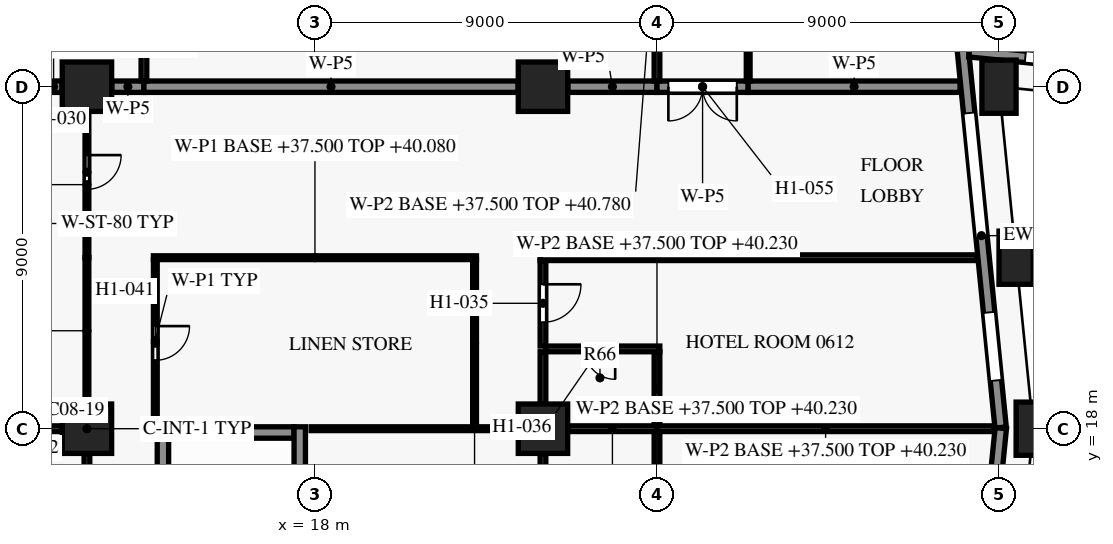
"""IFC4 building model, lengths in metres.
Left out: names, types, materials, properties, quantities, classifications, styles, units other than length and angle.
Written with IfcOpenShell. Run it as: python <this file> out.ifc"""

import sys

from ifc_helpers import new_model, si_unit, direction, frame, frame_2d, origin, origin_2d, place, context, subcontext, project, spatial, rectangle, extrude, element, fill, save


model = new_model("IFC4")
c1 = context("Model", 3, precision=1e-05, world=origin(), true_north=direction((0.0, 1.0)))
c2 = subcontext(c1, "Body", "Model", "MODEL_VIEW")
j1 = project(units=[si_unit("LENGTHUNIT", "METRE"), si_unit("PLANEANGLEUNIT", "RADIAN")], contexts=[c1])
p1 = place(None, origin())
s1 = spatial("IfcSite", under=j1, at=p1, CompositionType="ELEMENT")
p2 = place(p1, origin())
s2 = spatial("IfcBuilding", under=s1, at=p2, CompositionType="ELEMENT")
p3 = place(p2, frame((0.0, 0.0, 37.5)))
s3 = spatial("IfcBuildingStorey", under=s2, at=p3, CompositionType="ELEMENT", Elevation=37.5)
for number, where, z_axis, x_axis in (
    (1, (36.9, 18.0, 0.0), (0.0, 0.0, 1.0), (0.0, 1.0, 0.0)),
    (2, (36.45, 22.5, 0.0), (0.0, 0.0, 1.0), (-0.1, 0.995, 0.0)),
    (3, (36.0, 27.0, 0.0), (0.0, 0.0, 1.0), (-0.1, 0.995, 0.0)),
):
    element("IfcColumn", number, at=place(p3, frame(where, z_axis=z_axis, x_axis=x_axis)), inside=s3, PredefinedType="COLUMN", context=c2, shape_type="SweptSolid", body=[
        extrude(rectangle(XDim=0.9, YDim=1.4, at=origin_2d()), origin(), (0.0, 0.0, 1.0), 3.6),
    ])
for number, where, z_axis, x_axis in (
    (4, (12.0, 18.0, 0.0), (0.0, 0.0, 1.0), (1.0, 0.0, 0.0)),
    (5, (12.0, 27.0, 0.0), (0.0, 0.0, 1.0), (1.0, 0.0, 0.0)),
    (6, (24.0, 18.0, 0.0), (0.0, 0.0, 1.0), (1.0, 0.0, 0.0)),
    (7, (24.0, 27.0, 0.0), (0.0, 0.0, 1.0), (1.0, 0.0, 0.0)),
):
    element("IfcColumn", number, at=place(p3, frame(where, z_axis=z_axis, x_axis=x_axis)), inside=s3, PredefinedType="COLUMN", context=c2, shape_type="SweptSolid", body=[
        extrude(rectangle(XDim=1.3, YDim=1.3, at=origin_2d()), origin(), (0.0, 0.0, 1.0), 3.6),
    ])
p4 = place(p3, frame((36.047, 18.015, 0.0), z_axis=(0.0, 0.0, 1.0), x_axis=(-0.099522457379, -0.995035316196, 0.0)))
e8 = element("IfcWall", 8, at=p4, inside=s3, PredefinedType="SOLIDWALL", context=c2, shape_type="SweptSolid", body=[
    extrude(rectangle(XDim=9.03, YDim=0.3, at=frame_2d((4.515, 0.0))), origin(), (0.0, 0.0, 1.0), 2.95),
])
p5 = place(p4, frame((1.291, 0.0, 0.75)))
e9 = element("IfcOpeningElement", 9, at=p5, cuts=e8, PredefinedType="OPENING", context=c2, shape_type="SweptSolid", body=[
    extrude(rectangle(XDim=1.8, YDim=1.8, at=frame_2d((0.9, 0.9))), frame((0.0, 0.16, 0.0), z_axis=(0.0, -1.0, 0.0), x_axis=(1.0, 0.0, 0.0)), (0.0, 0.0, 1.0), 0.32),
])
p6 = place(p4, frame((5.064, 0.0, 0.15)))
e10 = element("IfcOpeningElement", 10, at=p6, cuts=e8, PredefinedType="OPENING", context=c2, shape_type="SweptSolid", body=[
    extrude(rectangle(XDim=3.3, YDim=2.4, at=frame_2d((1.65, 1.2))), frame((0.0, 0.16, 0.0), z_axis=(0.0, -1.0, 0.0), x_axis=(1.0, 0.0, 0.0)), (0.0, 0.0, 1.0), 0.32),
])
p7 = place(p3, frame((35.033, 28.132, 0.0), z_axis=(0.0, 0.0, 1.0), x_axis=(0.099487051997, -0.995038856771, 0.0)))
e11 = element("IfcWall", 11, at=p7, inside=s3, PredefinedType="SOLIDWALL", context=c2, shape_type="SweptSolid", body=[
    extrude(rectangle(XDim=10.152, YDim=0.3, at=frame_2d((5.076, 0.0))), origin(), (0.0, 0.0, 1.0), 2.95),
])
p8 = place(p7, frame((1.833, 0.0, 0.15)))
e12 = element("IfcOpeningElement", 12, at=p8, cuts=e11, PredefinedType="OPENING", context=c2, shape_type="SweptSolid", body=[
    extrude(rectangle(XDim=3.3, YDim=2.4, at=frame_2d((1.65, 1.2))), frame((0.0, 0.16, 0.0), z_axis=(0.0, -1.0, 0.0), x_axis=(1.0, 0.0, 0.0)), (0.0, 0.0, 1.0), 0.32),
])
p9 = place(p7, frame((7.106, 0.0, 0.75)))
e13 = element("IfcOpeningElement", 13, at=p9, cuts=e11, PredefinedType="OPENING", context=c2, shape_type="SweptSolid", body=[
    extrude(rectangle(XDim=1.8, YDim=1.8, at=frame_2d((0.9, 0.9))), frame((0.0, 0.16, 0.0), z_axis=(0.0, -1.0, 0.0), x_axis=(1.0, 0.0, 0.0)), (0.0, 0.0, 1.0), 0.32),
])
p10 = place(p3, frame((45.015, 26.953, 0.0), z_axis=(0.0, 0.0, 1.0), x_axis=(-0.995036699177, 0.099508629231, 0.0)))
e14 = element("IfcWall", 14, at=p10, inside=s3, PredefinedType="SOLIDWALL", context=c2, shape_type="SweptSolid", body=[
    extrude(rectangle(XDim=9.846, YDim=0.3, at=frame_2d((4.923, 0.0))), origin(), (0.0, 0.0, 1.0), 2.95),
])
p11 = place(p10, frame((1.291, 0.0, 0.75)))
e15 = element("IfcOpeningElement", 15, at=p11, cuts=e14, PredefinedType="OPENING", context=c2, shape_type="SweptSolid", body=[
    extrude(rectangle(XDim=1.8, YDim=1.8, at=frame_2d((0.9, 0.9))), frame((0.0, 0.16, 0.0), z_axis=(0.0, -1.0, 0.0), x_axis=(1.0, 0.0, 0.0)), (0.0, 0.0, 1.0), 0.32),
])
p12 = place(p10, frame((5.064, 0.0, 0.15)))
e16 = element("IfcOpeningElement", 16, at=p12, cuts=e14, PredefinedType="OPENING", context=c2, shape_type="SweptSolid", body=[
    extrude(rectangle(XDim=3.3, YDim=2.4, at=frame_2d((1.65, 1.2))), frame((0.0, 0.16, 0.0), z_axis=(0.0, -1.0, 0.0), x_axis=(1.0, 0.0, 0.0)), (0.0, 0.0, 1.0), 0.32),
])
p13 = place(p3, frame((14.15, 17.9, 0.0), z_axis=(0.0, 0.0, 1.0), x_axis=(1.0, 0.0, 0.0)))
e17 = element("IfcWall", 17, at=p13, inside=s3, PredefinedType="SHEAR", context=c2, shape_type="SweptSolid", body=[
    extrude(rectangle(XDim=3.3, YDim=0.3, at=frame_2d((1.65, 0.0))), origin(), (0.0, 0.0, 1.0), 3.3),
])
p14 = place(p3, frame((14.0, 9.75, 0.0), z_axis=(0.0, 0.0, 1.0), x_axis=(0.0, 1.0, 0.0)))
e18 = element("IfcWall", 18, at=p14, inside=s3, PredefinedType="SHEAR", context=c2, shape_type="SweptSolid", body=[
    extrude(rectangle(XDim=8.3, YDim=0.3, at=frame_2d((4.15, 0.0))), origin(), (0.0, 0.0, 1.0), 3.3),
])
p15 = place(p3, frame((17.6, 9.75, 0.0), z_axis=(0.0, 0.0, 1.0), x_axis=(0.0, 1.0, 0.0)))
e19 = element("IfcWall", 19, at=p15, inside=s3, PredefinedType="SHEAR", context=c2, shape_type="SweptSolid", body=[
    extrude(rectangle(XDim=8.3, YDim=0.3, at=frame_2d((4.15, 0.0))), origin(), (0.0, 0.0, 1.0), 3.3),
])
p16 = place(p15, frame((0.65, 0.0, 0.0)))
e20 = element("IfcOpeningElement", 20, at=p16, cuts=e19, PredefinedType="OPENING", context=c2, shape_type="SweptSolid", body=[
    extrude(rectangle(XDim=1.2, YDim=2.2, at=frame_2d((0.6, 1.1))), frame((0.0, 0.16, 0.0), z_axis=(0.0, -1.0, 0.0), x_axis=(1.0, 0.0, 0.0)), (0.0, 0.0, 1.0), 0.32),
])
p17 = place(p3, frame((12.0, 15.975, 0.0), z_axis=(0.0, 0.0, 1.0), x_axis=(0.0, 1.0, 0.0)))
e21 = element("IfcWall", 21, at=p17, inside=s3, PredefinedType="PARTITIONING", context=c2, shape_type="SweptSolid", body=[
    extrude(rectangle(XDim=1.37, YDim=0.15, at=frame_2d((0.685, 0.0))), origin(), (0.0, 0.0, 1.0), 2.58),
])
p18 = place(p3, frame((27.0, 15.975, 0.0), z_axis=(0.0, 0.0, 1.0), x_axis=(0.0, 1.0, 0.0)))
e22 = element("IfcWall", 22, at=p18, inside=s3, PredefinedType="PARTITIONING", context=c2, shape_type="SweptSolid", body=[
    extrude(rectangle(XDim=1.95, YDim=0.15, at=frame_2d((0.975, 0.0))), origin(), (0.0, 0.0, 1.0), 2.73),
])
p19 = place(p3, frame((24.0, 17.345, 0.0), z_axis=(0.0, 0.0, 1.0), x_axis=(0.0, -1.0, 0.0)))
e23 = element("IfcWall", 23, at=p19, inside=s3, PredefinedType="PARTITIONING", context=c2, shape_type="SweptSolid", body=[
    extrude(rectangle(XDim=1.37, YDim=0.15, at=frame_2d((0.685, 0.0))), origin(), (0.0, 0.0, 1.0), 2.58),
])
p20 = place(p3, frame((11.345, 18.0, 0.0), z_axis=(0.0, 0.0, 1.0), x_axis=(-1.0, 0.0, 0.0)))
e24 = element("IfcWall", 24, at=p20, inside=s3, PredefinedType="PARTITIONING", context=c2, shape_type="SweptSolid", body=[
    extrude(rectangle(XDim=2.345, YDim=0.15, at=frame_2d((1.172, 0.0))), origin(), (0.0, 0.0, 1.0), 2.73),
])
p21 = place(p3, frame((23.33, 18.0, 0.0), z_axis=(0.0, 0.0, 1.0), x_axis=(-1.0, 0.0, 0.0)))
e25 = element("IfcWall", 25, at=p21, inside=s3, PredefinedType="PARTITIONING", context=c2, shape_type="SweptSolid", body=[
    extrude(rectangle(XDim=5.43, YDim=0.1, at=frame_2d((2.715, 0.0))), origin(), (0.0, 0.0, 1.0), 2.73),
])
p22 = place(p3, frame((27.0, 18.0, 0.0), z_axis=(0.0, 0.0, 1.0), x_axis=(-1.0, 0.0, 0.0)))
e26 = element("IfcWall", 26, at=p22, inside=s3, PredefinedType="PARTITIONING", context=c2, shape_type="SweptSolid", body=[
    extrude(rectangle(XDim=2.345, YDim=0.15, at=frame_2d((1.172, 0.0))), origin(), (0.0, 0.0, 1.0), 2.73),
])
p23 = place(p3, frame((35.875, 18.0, 0.0), z_axis=(0.0, 0.0, 1.0), x_axis=(-1.0, 0.0, 0.0)))
e27 = element("IfcWall", 27, at=p23, inside=s3, PredefinedType="PARTITIONING", context=c2, shape_type="SweptSolid", body=[
    extrude(rectangle(XDim=8.875, YDim=0.15, at=frame_2d((4.438, 0.0))), origin(), (0.0, 0.0, 1.0), 2.73),
])
p24 = place(p3, frame((22.2, 18.05, 0.0), z_axis=(0.0, 0.0, 1.0), x_axis=(0.0, 1.0, 0.0)))
e28 = element("IfcWall", 28, at=p24, inside=s3, PredefinedType="PARTITIONING", context=c2, shape_type="SweptSolid", body=[
    extrude(rectangle(XDim=4.4, YDim=0.1, at=frame_2d((2.2, 0.0))), origin(), (0.0, 0.0, 1.0), 2.73),
])
p25 = place(p3, frame((27.0, 18.075, 0.0), z_axis=(0.0, 0.0, 1.0), x_axis=(0.0, 1.0, 0.0)))
e29 = element("IfcWall", 29, at=p25, inside=s3, PredefinedType="PARTITIONING", context=c2, shape_type="SweptSolid", body=[
    extrude(rectangle(XDim=1.95, YDim=0.15, at=frame_2d((0.975, 0.0))), origin(), (0.0, 0.0, 1.0), 2.73),
])
p26 = place(p3, frame((24.0, 20.025, 0.0), z_axis=(0.0, 0.0, 1.0), x_axis=(0.0, -1.0, 0.0)))
e30 = element("IfcWall", 30, at=p26, inside=s3, PredefinedType="PARTITIONING", context=c2, shape_type="SweptSolid", body=[
    extrude(rectangle(XDim=1.37, YDim=0.15, at=frame_2d((0.685, 0.0))), origin(), (0.0, 0.0, 1.0), 2.58),
])
p27 = place(p3, frame((27.075, 20.1, 0.0), z_axis=(0.0, 0.0, 1.0), x_axis=(-1.0, 0.0, 0.0)))
e31 = element("IfcWall", 31, at=p27, inside=s3, PredefinedType="PARTITIONING", context=c2, shape_type="SweptSolid", body=[
    extrude(rectangle(XDim=3.0, YDim=0.15, at=frame_2d((1.5, 0.0))), origin(), (0.0, 0.0, 1.0), 2.58),
])
p28 = place(p27, frame((1.175, 0.0, 0.0)))
e32 = element("IfcOpeningElement", 32, at=p28, cuts=e31, PredefinedType="OPENING", context=c2, shape_type="SweptSolid", body=[
    extrude(rectangle(XDim=0.8, YDim=2.1, at=frame_2d((0.4, 1.05))), frame((0.0, 0.085, 0.0), z_axis=(0.0, -1.0, 0.0), x_axis=(1.0, 0.0, 0.0)), (0.0, 0.0, 1.0), 0.17),
])
p29 = place(p3, frame((24.0, 22.425, 0.0), z_axis=(0.0, 0.0, 1.0), x_axis=(0.0, -1.0, 0.0)))
e33 = element("IfcWall", 33, at=p29, inside=s3, PredefinedType="PARTITIONING", context=c2, shape_type="SweptSolid", body=[
    extrude(rectangle(XDim=2.25, YDim=0.15, at=frame_2d((1.125, 0.0))), origin(), (0.0, 0.0, 1.0), 2.58),
])
p30 = place(p29, frame((0.625, 0.0, 0.0)))
e34 = element("IfcOpeningElement", 34, at=p30, cuts=e33, PredefinedType="OPENING", context=c2, shape_type="SweptSolid", body=[
    extrude(rectangle(XDim=1.0, YDim=2.1, at=frame_2d((0.5, 1.05))), frame((0.0, 0.085, 0.0), z_axis=(0.0, -1.0, 0.0), x_axis=(1.0, 0.0, 0.0)), (0.0, 0.0, 1.0), 0.17),
])
p31 = place(p3, frame((13.8, 22.45, 0.0), z_axis=(0.0, 0.0, 1.0), x_axis=(0.0, -1.0, 0.0)))
e35 = element("IfcWall", 35, at=p31, inside=s3, PredefinedType="PARTITIONING", context=c2, shape_type="SweptSolid", body=[
    extrude(rectangle(XDim=4.25, YDim=0.1, at=frame_2d((2.125, 0.0))), origin(), (0.0, 0.0, 1.0), 3.28),
])
p32 = place(p31, frame((1.75, 0.0, 0.0)))
e36 = element("IfcOpeningElement", 36, at=p32, cuts=e35, PredefinedType="OPENING", context=c2, shape_type="SweptSolid", body=[
    extrude(rectangle(XDim=0.9, YDim=2.1, at=frame_2d((0.45, 1.05))), frame((0.0, 0.06, 0.0), z_axis=(0.0, -1.0, 0.0), x_axis=(1.0, 0.0, 0.0)), (0.0, 0.0, 1.0), 0.12),
])
p33 = place(p3, frame((12.0, 22.5, 0.0), z_axis=(0.0, 0.0, 1.0), x_axis=(0.0, -1.0, 0.0)))
e37 = element("IfcWall", 37, at=p33, inside=s3, PredefinedType="PARTITIONING", context=c2, shape_type="SweptSolid", body=[
    extrude(rectangle(XDim=3.845, YDim=0.1, at=frame_2d((1.922, 0.0))), origin(), (0.0, 0.0, 1.0), 2.58),
])
p34 = place(p3, frame((12.0, 26.345, 0.0), z_axis=(0.0, 0.0, 1.0), x_axis=(0.0, -1.0, 0.0)))
e38 = element("IfcWall", 38, at=p34, inside=s3, PredefinedType="PARTITIONING", context=c2, shape_type="SweptSolid", body=[
    extrude(rectangle(XDim=3.845, YDim=0.1, at=frame_2d((1.922, 0.0))), origin(), (0.0, 0.0, 1.0), 2.58),
])
p35 = place(p34, frame((1.145, 0.0, 0.0)))
e39 = element("IfcOpeningElement", 39, at=p35, cuts=e38, PredefinedType="OPENING", context=c2, shape_type="SweptSolid", body=[
    extrude(rectangle(XDim=0.9, YDim=2.1, at=frame_2d((0.45, 1.05))), frame((0.0, 0.06, 0.0), z_axis=(0.0, -1.0, 0.0), x_axis=(1.0, 0.0, 0.0)), (0.0, 0.0, 1.0), 0.12),
])
p36 = place(p3, frame((22.25, 22.5, 0.0), z_axis=(0.0, 0.0, 1.0), x_axis=(-1.0, 0.0, 0.0)))
e40 = element("IfcWall", 40, at=p36, inside=s3, PredefinedType="PARTITIONING", context=c2, shape_type="SweptSolid", body=[
    extrude(rectangle(XDim=8.5, YDim=0.1, at=frame_2d((4.25, 0.0))), origin(), (0.0, 0.0, 1.0), 2.58),
])
p37 = place(p3, frame((35.425, 22.5, 0.0), z_axis=(0.0, 0.0, 1.0), x_axis=(-1.0, 0.0, 0.0)))
e41 = element("IfcWall", 41, at=p37, inside=s3, PredefinedType="PARTITIONING", context=c2, shape_type="SweptSolid", body=[
    extrude(rectangle(XDim=11.5, YDim=0.15, at=frame_2d((5.75, 0.0))), origin(), (0.0, 0.0, 1.0), 2.58),
])
p38 = place(p3, frame((11.345, 27.0, 0.0), z_axis=(0.0, 0.0, 1.0), x_axis=(-1.0, 0.0, 0.0)))
e42 = element("IfcWall", 42, at=p38, inside=s3, PredefinedType="PARTITIONING", context=c2, shape_type="SweptSolid", body=[
    extrude(rectangle(XDim=0.445, YDim=0.3, at=frame_2d((0.223, 0.0))), origin(), (0.0, 0.0, 1.0), 3.28),
])
p39 = place(p3, frame((13.5, 27.0, 0.0), z_axis=(0.0, 0.0, 1.0), x_axis=(-1.0, 0.0, 0.0)))
e43 = element("IfcWall", 43, at=p39, inside=s3, PredefinedType="PARTITIONING", context=c2, shape_type="SweptSolid", body=[
    extrude(rectangle(XDim=0.845, YDim=0.3, at=frame_2d((0.422, 0.0))), origin(), (0.0, 0.0, 1.0), 2.58),
])
p40 = place(p3, frame((23.345, 27.0, 0.0), z_axis=(0.0, 0.0, 1.0), x_axis=(-1.0, 0.0, 0.0)))
e44 = element("IfcWall", 44, at=p40, inside=s3, PredefinedType="PARTITIONING", context=c2, shape_type="SweptSolid", body=[
    extrude(rectangle(XDim=9.845, YDim=0.3, at=frame_2d((4.922, 0.0))), origin(), (0.0, 0.0, 1.0), 2.58),
])
p41 = place(p3, frame((27.0, 27.0, 0.0), z_axis=(0.0, 0.0, 1.0), x_axis=(-1.0, 0.0, 0.0)))
e45 = element("IfcWall", 45, at=p41, inside=s3, PredefinedType="PARTITIONING", context=c2, shape_type="SweptSolid", body=[
    extrude(rectangle(XDim=2.345, YDim=0.3, at=frame_2d((1.172, 0.0))), origin(), (0.0, 0.0, 1.0), 2.58),
])
p42 = place(p3, frame((29.4, 27.0, 0.0), z_axis=(0.0, 0.0, 1.0), x_axis=(-1.0, 0.0, 0.0)))
e46 = element("IfcWall", 46, at=p42, inside=s3, PredefinedType="PARTITIONING", context=c2, shape_type="SweptSolid", body=[
    extrude(rectangle(XDim=2.4, YDim=0.3, at=frame_2d((1.2, 0.0))), origin(), (0.0, 0.0, 1.0), 2.58),
])
p43 = place(p42, frame((0.3, 0.0, 0.0)))
e47 = element("IfcOpeningElement", 47, at=p43, cuts=e46, PredefinedType="OPENING", context=c2, shape_type="SweptSolid", body=[
    extrude(rectangle(XDim=1.8, YDim=2.1, at=frame_2d((0.9, 1.05))), frame((0.0, 0.16, 0.0), z_axis=(0.0, -1.0, 0.0), x_axis=(1.0, 0.0, 0.0)), (0.0, 0.0, 1.0), 0.32),
])
p44 = place(p3, frame((34.975, 27.0, 0.0), z_axis=(0.0, 0.0, 1.0), x_axis=(-1.0, 0.0, 0.0)))
e48 = element("IfcWall", 48, at=p44, inside=s3, PredefinedType="PARTITIONING", context=c2, shape_type="SweptSolid", body=[
    extrude(rectangle(XDim=5.575, YDim=0.3, at=frame_2d((2.788, 0.0))), origin(), (0.0, 0.0, 1.0), 2.58),
])
p45 = place(p3, frame((27.0, 27.15, 0.0), z_axis=(0.0, 0.0, 1.0), x_axis=(0.0, 1.0, 0.0)))
e49 = element("IfcWall", 49, at=p45, inside=s3, PredefinedType="PARTITIONING", context=c2, shape_type="SweptSolid", body=[
    extrude(rectangle(XDim=8.7, YDim=0.15, at=frame_2d((4.35, 0.0))), origin(), (0.0, 0.0, 1.0), 3.28),
])
p46 = place(p45, frame((3.45, 0.0, 0.0)))
e50 = element("IfcOpeningElement", 50, at=p46, cuts=e49, PredefinedType="OPENING", context=c2, shape_type="SweptSolid", body=[
    extrude(rectangle(XDim=1.8, YDim=2.1, at=frame_2d((0.9, 1.05))), frame((0.0, 0.085, 0.0), z_axis=(0.0, -1.0, 0.0), x_axis=(1.0, 0.0, 0.0)), (0.0, 0.0, 1.0), 0.17),
])
p47 = place(p3, frame((13.5, 27.15, 0.0), z_axis=(0.0, 0.0, 1.0), x_axis=(0.0, 1.0, 0.0)))
e51 = element("IfcWall", 51, at=p47, inside=s3, PredefinedType="PARTITIONING", context=c2, shape_type="SweptSolid", body=[
    extrude(rectangle(XDim=8.7, YDim=0.15, at=frame_2d((4.35, 0.0))), origin(), (0.0, 0.0, 1.0), 3.28),
])
p48 = place(p47, frame((3.45, 0.0, 0.0)))
e52 = element("IfcOpeningElement", 52, at=p48, cuts=e51, PredefinedType="OPENING", context=c2, shape_type="SweptSolid", body=[
    extrude(rectangle(XDim=1.8, YDim=2.1, at=frame_2d((0.9, 1.05))), frame((0.0, 0.085, 0.0), z_axis=(0.0, -1.0, 0.0), x_axis=(1.0, 0.0, 0.0)), (0.0, 0.0, 1.0), 0.17),
])
p49 = place(p3, frame((29.4, 35.95, 0.0), z_axis=(0.0, 0.0, 1.0), x_axis=(0.0, -1.0, 0.0)))
e53 = element("IfcWall", 53, at=p49, inside=s3, PredefinedType="PARTITIONING", context=c2, shape_type="SweptSolid", body=[
    extrude(rectangle(XDim=8.8, YDim=0.1, at=frame_2d((4.4, 0.0))), origin(), (0.0, 0.0, 1.0), 3.28),
])
p50 = place(p49, frame((4.5, 0.0, 0.0)))
e54 = element("IfcOpeningElement", 54, at=p50, cuts=e53, PredefinedType="OPENING", context=c2, shape_type="SweptSolid", body=[
    extrude(rectangle(XDim=0.9, YDim=2.1, at=frame_2d((0.45, 1.05))), frame((0.0, 0.06, 0.0), z_axis=(0.0, -1.0, 0.0), x_axis=(1.0, 0.0, 0.0)), (0.0, 0.0, 1.0), 0.12),
])
p51 = place(p8, origin())
e55 = element("IfcWindow", 55, at=p51, inside=s3, PartitioningType="SINGLE_PANEL", PredefinedType="WINDOW", context=c2, shape_type="SweptSolid", body=[
    extrude(rectangle(XDim=3.3, YDim=2.4, at=frame_2d((1.65, 1.2))), frame((0.0, 0.03, 0.0), z_axis=(0.0, -1.0, 0.0), x_axis=(1.0, 0.0, 0.0)), (0.0, 0.0, 1.0), 0.06),
])
fill(e12, e55)
p52 = place(p9, origin())
e56 = element("IfcWindow", 56, at=p52, inside=s3, PartitioningType="SINGLE_PANEL", PredefinedType="WINDOW", context=c2, shape_type="SweptSolid", body=[
    extrude(rectangle(XDim=1.8, YDim=1.8, at=frame_2d((0.9, 0.9))), frame((0.0, 0.03, 0.0), z_axis=(0.0, -1.0, 0.0), x_axis=(1.0, 0.0, 0.0)), (0.0, 0.0, 1.0), 0.06),
])
fill(e13, e56)
p53 = place(p12, origin())
e57 = element("IfcWindow", 57, at=p53, inside=s3, PartitioningType="SINGLE_PANEL", PredefinedType="WINDOW", context=c2, shape_type="SweptSolid", body=[
    extrude(rectangle(XDim=3.3, YDim=2.4, at=frame_2d((1.65, 1.2))), frame((0.0, 0.03, 0.0), z_axis=(0.0, -1.0, 0.0), x_axis=(1.0, 0.0, 0.0)), (0.0, 0.0, 1.0), 0.06),
])
fill(e16, e57)
p54 = place(p35, origin())
e58 = element("IfcDoor", 58, at=p54, inside=s3, OperationType="SINGLE_SWING_LEFT", PredefinedType="DOOR", context=c2, shape_type="SweptSolid", body=[
    extrude(rectangle(XDim=0.9, YDim=2.1, at=frame_2d((0.45, 1.05))), frame((0.0, 0.025, 0.0), z_axis=(0.0, -1.0, 0.0), x_axis=(1.0, 0.0, 0.0)), (0.0, 0.0, 1.0), 0.05),
])
fill(e39, e58)
p55 = place(p30, origin())
e59 = element("IfcDoor", 59, at=p55, inside=s3, OperationType="SINGLE_SWING_LEFT", PredefinedType="DOOR", context=c2, shape_type="SweptSolid", body=[
    extrude(rectangle(XDim=1.0, YDim=2.1, at=frame_2d((0.5, 1.05))), frame((0.0, 0.025, 0.0), z_axis=(0.0, -1.0, 0.0), x_axis=(1.0, 0.0, 0.0)), (0.0, 0.0, 1.0), 0.05),
])
fill(e34, e59)
p56 = place(p28, origin())
e60 = element("IfcDoor", 60, at=p56, inside=s3, OperationType="SINGLE_SWING_LEFT", PredefinedType="DOOR", context=c2, shape_type="SweptSolid", body=[
    extrude(rectangle(XDim=0.8, YDim=2.1, at=frame_2d((0.4, 1.05))), frame((0.0, 0.025, 0.0), z_axis=(0.0, -1.0, 0.0), x_axis=(1.0, 0.0, 0.0)), (0.0, 0.0, 1.0), 0.05),
])
fill(e32, e60)
p57 = place(p32, origin())
e61 = element("IfcDoor", 61, at=p57, inside=s3, OperationType="SINGLE_SWING_LEFT", PredefinedType="DOOR", context=c2, shape_type="SweptSolid", body=[
    extrude(rectangle(XDim=0.9, YDim=2.1, at=frame_2d((0.45, 1.05))), frame((0.0, 0.025, 0.0), z_axis=(0.0, -1.0, 0.0), x_axis=(1.0, 0.0, 0.0)), (0.0, 0.0, 1.0), 0.05),
])
fill(e36, e61)
p58 = place(p43, origin())
e62 = element("IfcDoor", 62, at=p58, inside=s3, OperationType="DOUBLE_DOOR_SINGLE_SWING", PredefinedType="DOOR", context=c2, shape_type="SweptSolid", body=[
    extrude(rectangle(XDim=1.8, YDim=2.1, at=frame_2d((0.9, 1.05))), frame((0.0, 0.025, 0.0), z_axis=(0.0, -1.0, 0.0), x_axis=(1.0, 0.0, 0.0)), (0.0, 0.0, 1.0), 0.05),
])
fill(e47, e62)
save(model, sys.argv[1])
